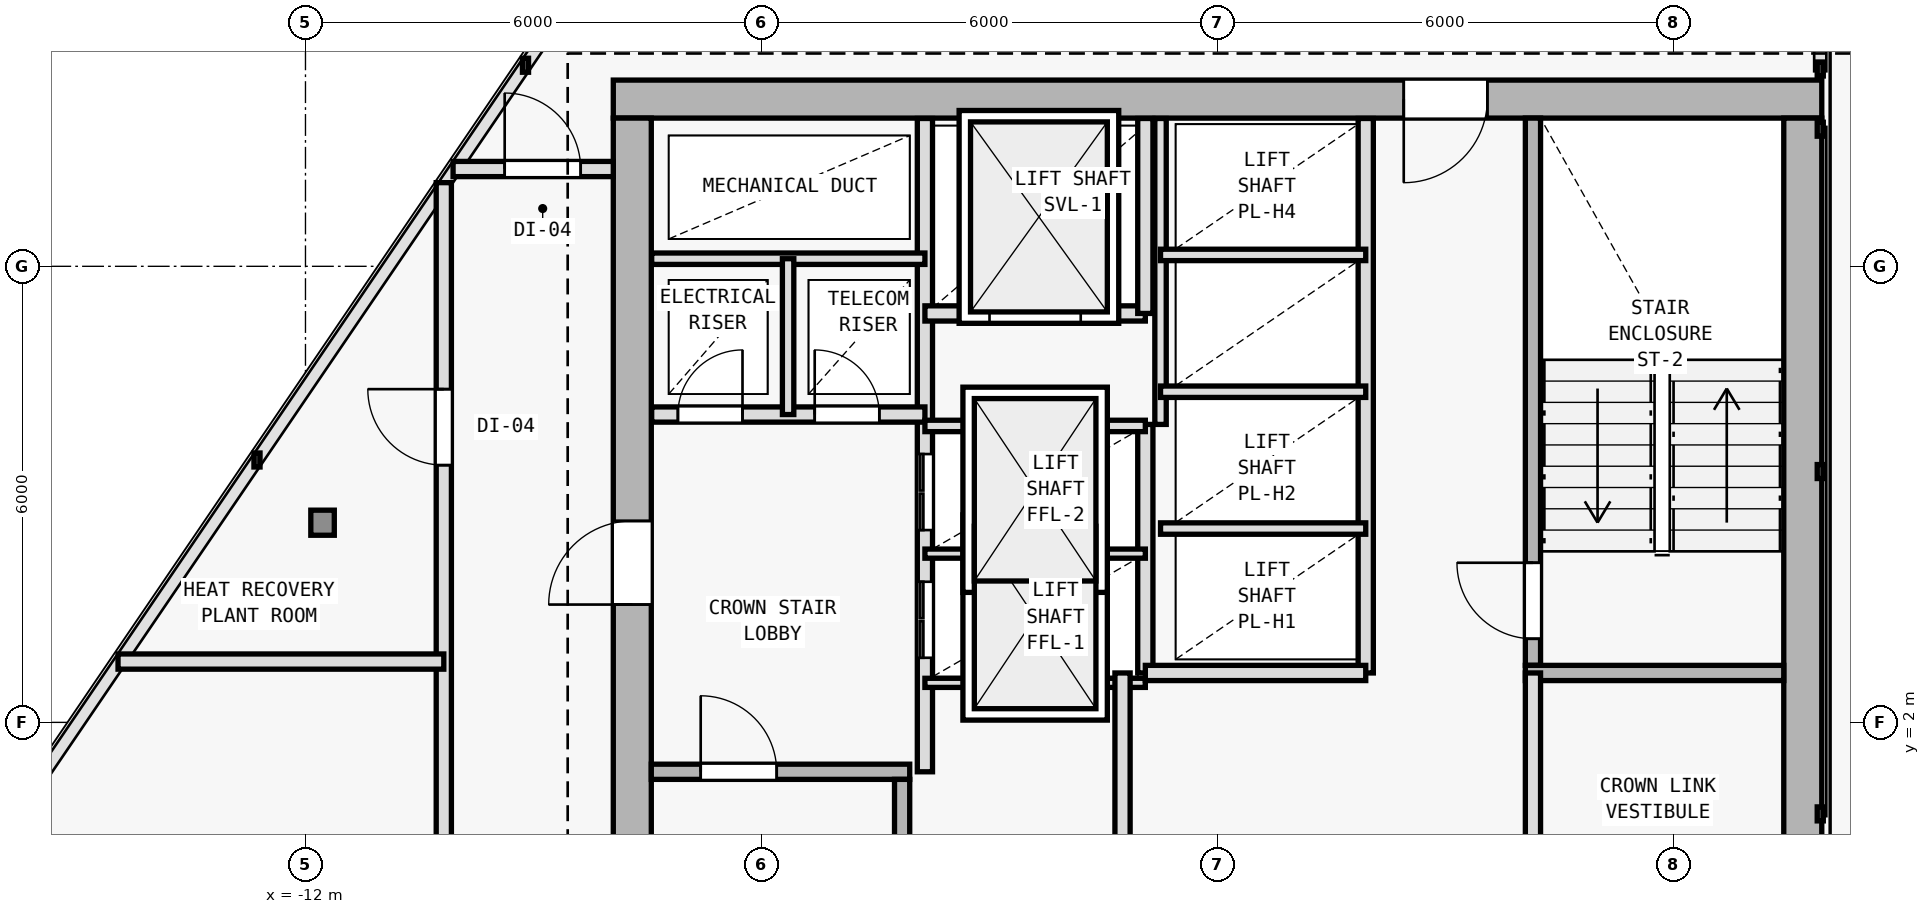
"""IFC4 building model, lengths in metres.
Left out: names, types, materials, properties, quantities, classifications, styles, units other than length and angle.
Written with IfcOpenShell. Run it as: python <this file> out.ifc"""

import sys

from ifc_helpers import new_model, si_unit, direction, frame, frame_2d, origin, origin_2d, place, context, subcontext, project, spatial, rectangle, i_section, extrude, element, fill, save


model = new_model("IFC4")
c1 = context("Model", 3, precision=1e-05, world=origin(), true_north=direction((0.0, 1.0)))
c2 = subcontext(c1, "Body", "Model", "MODEL_VIEW")
j1 = project(units=[si_unit("LENGTHUNIT", "METRE"), si_unit("PLANEANGLEUNIT", "RADIAN")], contexts=[c1])
p1 = place(None, origin())
s1 = spatial("IfcSite", under=j1, at=p1, CompositionType="ELEMENT")
p2 = place(p1, origin())
s2 = spatial("IfcBuilding", under=s1, at=p2, CompositionType="ELEMENT")
p3 = place(p2, frame((0.0, 0.0, 297.6)))
s3 = spatial("IfcBuildingStorey", under=s2, at=p3, CompositionType="ELEMENT", Elevation=297.6)
for number, where, z_axis, x_axis in (
    (1, (7.7, 10.2, 0.0), (0.0, 0.0, 1.0), (1.0, 0.0, 0.0)),
    (2, (-7.7, 10.2, 0.0), (0.0, 0.0, 1.0), (1.0, 0.0, 0.0)),
    (3, (7.7, 0.4, 0.0), (0.0, 0.0, 1.0), (1.0, 0.0, 0.0)),
    (4, (-7.7, 2.0, 0.0), (0.0, 0.0, 1.0), (1.0, 0.0, 0.0)),
):
    element("IfcColumn", number, at=place(p3, frame(where, z_axis=z_axis, x_axis=x_axis)), inside=s3, PredefinedType="COLUMN", context=c2, shape_type="SweptSolid", body=[
        extrude(i_section(OverallWidth=0.374, OverallDepth=0.372, WebThickness=0.012, FlangeThickness=0.02, FilletRadius=0.015, at=origin_2d()), origin(), (0.0, 0.0, 1.0), 3.6),
    ])
p4 = place(p3, frame((-11.775, 4.627, 0.0), z_axis=(0.0, 0.0, 1.0), x_axis=(1.0, 0.0, 0.0)))
e5 = element("IfcColumn", 5, at=p4, inside=s3, PredefinedType="COLUMN", context=c2, shape_type="SweptSolid", body=[
    extrude(i_section(OverallWidth=0.309, OverallDepth=0.33, WebThickness=0.011, FlangeThickness=0.019, FilletRadius=0.027, at=origin_2d()), origin(), (0.0, 0.0, 1.0), 3.6),
])
p5 = place(p3, frame((7.95, 10.2, 0.0), z_axis=(0.0, 0.0, 1.0), x_axis=(-1.0, 0.0, 0.0)))
e6 = element("IfcWall", 6, at=p5, inside=s3, PredefinedType="SHEAR", context=c2, shape_type="SweptSolid", body=[
    extrude(rectangle(XDim=15.9, YDim=0.5, at=frame_2d((7.95, 0.0))), origin(), (0.0, 0.0, 1.0), 3.34),
])
p6 = place(p5, frame((4.4, 0.0, 0.0)))
e7 = element("IfcOpeningElement", 7, at=p6, cuts=e6, PredefinedType="OPENING", context=c2, shape_type="SweptSolid", body=[
    extrude(rectangle(XDim=1.1, YDim=2.15, at=frame_2d((0.55, 1.075))), frame((0.0, 0.26, 0.0), z_axis=(0.0, -1.0, 0.0), x_axis=(1.0, 0.0, 0.0)), (0.0, 0.0, 1.0), 0.52),
])
p7 = place(p3, frame((-7.7, -9.15, 0.0), z_axis=(0.0, 0.0, 1.0), x_axis=(0.0, 1.0, 0.0)))
e8 = element("IfcWall", 8, at=p7, inside=s3, PredefinedType="SHEAR", context=c2, shape_type="SweptSolid", body=[
    extrude(rectangle(XDim=19.1, YDim=0.5, at=frame_2d((9.55, 0.0))), origin(), (0.0, 0.0, 1.0), 3.34),
])
p8 = place(p7, frame((12.7, 0.0, 0.0)))
e9 = element("IfcOpeningElement", 9, at=p8, cuts=e8, PredefinedType="OPENING", context=c2, shape_type="SweptSolid", body=[
    extrude(rectangle(XDim=1.1, YDim=2.15, at=frame_2d((0.55, 1.075))), frame((0.0, 0.26, 0.0), z_axis=(0.0, -1.0, 0.0), x_axis=(1.0, 0.0, 0.0)), (0.0, 0.0, 1.0), 0.52),
])
p9 = place(p3, frame((7.7, 9.95, 0.0), z_axis=(0.0, 0.0, 1.0), x_axis=(0.0, -1.0, 0.0)))
e10 = element("IfcWall", 10, at=p9, inside=s3, PredefinedType="SHEAR", context=c2, shape_type="SweptSolid", body=[
    extrude(rectangle(XDim=19.1, YDim=0.5, at=frame_2d((9.55, 0.0))), origin(), (0.0, 0.0, 1.0), 3.34),
])
p10 = place(p9, frame((13.5, 0.0, 0.0)))
e11 = element("IfcOpeningElement", 11, at=p10, cuts=e10, PredefinedType="OPENING", context=c2, shape_type="SweptSolid", body=[
    extrude(rectangle(XDim=1.1, YDim=2.15, at=frame_2d((0.55, 1.075))), frame((0.0, 0.26, 0.0), z_axis=(0.0, -1.0, 0.0), x_axis=(1.0, 0.0, 0.0)), (0.0, 0.0, 1.0), 0.52),
])
p11 = place(p3, frame((-7.45, 1.35, 0.0), z_axis=(0.0, 0.0, 1.0), x_axis=(1.0, 0.0, 0.0)))
e12 = element("IfcWall", 12, at=p11, inside=s3, PredefinedType="SOLIDWALL", context=c2, shape_type="SweptSolid", body=[
    extrude(rectangle(XDim=3.4, YDim=0.2, at=frame_2d((1.7, 0.0))), origin(), (0.0, 0.0, 1.0), 3.34),
])
p12 = place(p11, frame((0.65, 0.0, 0.0)))
e13 = element("IfcOpeningElement", 13, at=p12, cuts=e12, PredefinedType="OPENING", context=c2, shape_type="SweptSolid", body=[
    extrude(rectangle(XDim=1.0, YDim=2.15, at=frame_2d((0.5, 1.075))), frame((0.0, 0.11, 0.0), z_axis=(0.0, -1.0, 0.0), x_axis=(1.0, 0.0, 0.0)), (0.0, 0.0, 1.0), 0.22),
])
p13 = place(p3, frame((-4.15, -5.95, 0.0), z_axis=(0.0, 0.0, 1.0), x_axis=(0.0, 1.0, 0.0)))
e14 = element("IfcWall", 14, at=p13, inside=s3, PredefinedType="SOLIDWALL", context=c2, shape_type="SweptSolid", body=[
    extrude(rectangle(XDim=7.2, YDim=0.2, at=frame_2d((3.6, 0.0))), origin(), (0.0, 0.0, 1.0), 3.34),
])
p14 = place(p3, frame((-3.85, 1.35, 0.0), z_axis=(0.0, 0.0, 1.0), x_axis=(0.0, 1.0, 0.0)))
e15 = element("IfcWall", 15, at=p14, inside=s3, PredefinedType="SOLIDWALL", context=c2, shape_type="SweptSolid", body=[
    extrude(rectangle(XDim=8.595, YDim=0.2, at=frame_2d((4.297, 0.0))), origin(), (0.0, 0.0, 1.0), 3.34),
])
p15 = place(p14, frame((1.5, 0.0, 0.0)))
e16 = element("IfcOpeningElement", 16, at=p15, cuts=e15, PredefinedType="OPENING", context=c2, shape_type="SweptSolid", body=[
    extrude(rectangle(XDim=1.0, YDim=2.15, at=frame_2d((0.5, 1.075))), frame((0.0, 0.11, 0.0), z_axis=(0.0, -1.0, 0.0), x_axis=(1.0, 0.0, 0.0)), (0.0, 0.0, 1.0), 0.22),
])
p16 = place(p14, frame((3.18, 0.0, 0.0)))
e17 = element("IfcOpeningElement", 17, at=p16, cuts=e15, PredefinedType="OPENING", context=c2, shape_type="SweptSolid", body=[
    extrude(rectangle(XDim=1.0, YDim=2.15, at=frame_2d((0.5, 1.075))), frame((0.0, 0.11, 0.0), z_axis=(0.0, -1.0, 0.0), x_axis=(1.0, 0.0, 0.0)), (0.0, 0.0, 1.0), 0.22),
])
p17 = place(p3, frame((-7.445, 6.05, 0.0), z_axis=(0.0, 0.0, 1.0), x_axis=(1.0, 0.0, 0.0)))
e18 = element("IfcWall", 18, at=p17, inside=s3, PredefinedType="SOLIDWALL", context=c2, shape_type="SweptSolid", body=[
    extrude(rectangle(XDim=3.595, YDim=0.2, at=frame_2d((1.797, 0.0))), origin(), (0.0, 0.0, 1.0), 3.34),
])
p18 = place(p17, frame((0.345, 0.0, 0.0)))
e19 = element("IfcOpeningElement", 19, at=p18, cuts=e18, PredefinedType="OPENING", context=c2, shape_type="SweptSolid", body=[
    extrude(rectangle(XDim=0.85, YDim=2.1, at=frame_2d((0.425, 1.05))), frame((0.0, 0.11, 0.0), z_axis=(0.0, -1.0, 0.0), x_axis=(1.0, 0.0, 0.0)), (0.0, 0.0, 1.0), 0.22),
])
p19 = place(p17, frame((2.145, 0.0, 0.0)))
e20 = element("IfcOpeningElement", 20, at=p19, cuts=e18, PredefinedType="OPENING", context=c2, shape_type="SweptSolid", body=[
    extrude(rectangle(XDim=0.85, YDim=2.1, at=frame_2d((0.425, 1.05))), frame((0.0, 0.11, 0.0), z_axis=(0.0, -1.0, 0.0), x_axis=(1.0, 0.0, 0.0)), (0.0, 0.0, 1.0), 0.22),
])
p20 = place(p3, frame((-7.445, 8.1, 0.0), z_axis=(0.0, 0.0, 1.0), x_axis=(1.0, 0.0, 0.0)))
e21 = element("IfcWall", 21, at=p20, inside=s3, PredefinedType="PARTITIONING", context=c2, shape_type="SweptSolid", body=[
    extrude(rectangle(XDim=3.595, YDim=0.15, at=frame_2d((1.797, 0.0))), origin(), (0.0, 0.0, 1.0), 3.34),
])
p21 = place(p3, frame((-5.65, 6.05, 0.0), z_axis=(0.0, 0.0, 1.0), x_axis=(0.0, 1.0, 0.0)))
e22 = element("IfcWall", 22, at=p21, inside=s3, PredefinedType="PARTITIONING", context=c2, shape_type="SweptSolid", body=[
    extrude(rectangle(XDim=2.05, YDim=0.15, at=frame_2d((1.025, 0.0))), origin(), (0.0, 0.0, 1.0), 3.34),
])
p22 = place(p3, frame((4.15, 2.75, 0.0), z_axis=(0.0, 0.0, 1.0), x_axis=(0.0, 1.0, 0.0)))
e23 = element("IfcWall", 23, at=p22, inside=s3, PredefinedType="SOLIDWALL", context=c2, shape_type="SweptSolid", body=[
    extrude(rectangle(XDim=7.2, YDim=0.2, at=frame_2d((3.6, 0.0))), origin(), (0.0, 0.0, 1.0), 3.34),
])
p23 = place(p22, frame((0.35, 0.0, 0.0)))
e24 = element("IfcOpeningElement", 24, at=p23, cuts=e23, PredefinedType="OPENING", context=c2, shape_type="SweptSolid", body=[
    extrude(rectangle(XDim=1.0, YDim=2.15, at=frame_2d((0.5, 1.075))), frame((0.0, 0.11, 0.0), z_axis=(0.0, -1.0, 0.0), x_axis=(1.0, 0.0, 0.0)), (0.0, 0.0, 1.0), 0.22),
])
p24 = place(p3, frame((4.05, 2.65, 0.0), z_axis=(0.0, 0.0, 1.0), x_axis=(1.0, 0.0, 0.0)))
e25 = element("IfcWall", 25, at=p24, inside=s3, PredefinedType="SOLIDWALL", context=c2, shape_type="SweptSolid", body=[
    extrude(rectangle(XDim=3.4, YDim=0.2, at=frame_2d((1.7, 0.0))), origin(), (0.0, 0.0, 1.0), 3.34),
])
p25 = place(p3, frame((-0.95, 2.65, 0.0), z_axis=(0.0, 0.0, 1.0), x_axis=(0.0, 1.0, 0.0)))
e26 = element("IfcWall", 26, at=p25, inside=s3, PredefinedType="SOLIDWALL", context=c2, shape_type="SweptSolid", body=[
    extrude(rectangle(XDim=3.27, YDim=0.2, at=frame_2d((1.635, 0.0))), origin(), (0.0, 0.0, 1.0), 3.34),
])
for number, where, z_axis, x_axis in (
    (27, (-3.85, 2.52, 0.0), (0.0, 0.0, 1.0), (1.0, 0.0, 0.0)),
    (28, (-3.85, 4.22, 0.0), (0.0, 0.0, 1.0), (1.0, 0.0, 0.0)),
):
    element("IfcWall", number, at=place(p3, frame(where, z_axis=z_axis, x_axis=x_axis)), inside=s3, PredefinedType="PARTITIONING", context=c2, shape_type="SweptSolid", body=[
        extrude(rectangle(XDim=2.9, YDim=0.12, at=frame_2d((1.45, 0.0))), origin(), (0.0, 0.0, 1.0), 3.34),
    ])
p26 = place(p3, frame((-3.85, 5.9, 0.0), z_axis=(0.0, 0.0, 1.0), x_axis=(1.0, 0.0, 0.0)))
e29 = element("IfcWall", 29, at=p26, inside=s3, PredefinedType="PARTITIONING", context=c2, shape_type="SweptSolid", body=[
    extrude(rectangle(XDim=2.9, YDim=0.15, at=frame_2d((1.45, 0.0))), origin(), (0.0, 0.0, 1.0), 3.34),
])
p27 = place(p3, frame((-3.85, 7.38, 0.0), z_axis=(0.0, 0.0, 1.0), x_axis=(1.0, 0.0, 0.0)))
e30 = element("IfcWall", 30, at=p27, inside=s3, PredefinedType="SOLIDWALL", context=c2, shape_type="SweptSolid", body=[
    extrude(rectangle(XDim=2.9, YDim=0.2, at=frame_2d((1.45, 0.0))), origin(), (0.0, 0.0, 1.0), 3.34),
])
p28 = place(p27, frame((0.85, 0.0, 0.0)))
e31 = element("IfcOpeningElement", 31, at=p28, cuts=e30, PredefinedType="OPENING", context=c2, shape_type="SweptSolid", body=[
    extrude(rectangle(XDim=1.2, YDim=2.2, at=frame_2d((0.6, 1.1))), frame((0.0, 0.11, 0.0), z_axis=(0.0, -1.0, 0.0), x_axis=(1.0, 0.0, 0.0)), (0.0, 0.0, 1.0), 0.22),
])
p29 = place(p3, frame((-0.95, 7.38, 0.0), z_axis=(0.0, 0.0, 1.0), x_axis=(0.0, 1.0, 0.0)))
e32 = element("IfcWall", 32, at=p29, inside=s3, PredefinedType="SOLIDWALL", context=c2, shape_type="SweptSolid", body=[
    extrude(rectangle(XDim=2.565, YDim=0.2, at=frame_2d((1.283, 0.0))), origin(), (0.0, 0.0, 1.0), 3.34),
])
p30 = place(p3, frame((4.15, -6.05, 0.0), z_axis=(0.0, 0.0, 1.0), x_axis=(0.0, 1.0, 0.0)))
e33 = element("IfcWall", 33, at=p30, inside=s3, PredefinedType="SOLIDWALL", context=c2, shape_type="SweptSolid", body=[
    extrude(rectangle(XDim=8.7, YDim=0.2, at=frame_2d((4.35, 0.0))), origin(), (0.0, 0.0, 1.0), 3.34),
])
p31 = place(p30, frame((3.6, 0.0, 0.0)))
e34 = element("IfcOpeningElement", 34, at=p31, cuts=e33, PredefinedType="OPENING", context=c2, shape_type="SweptSolid", body=[
    extrude(rectangle(XDim=1.0, YDim=2.15, at=frame_2d((0.5, 1.075))), frame((0.0, 0.11, 0.0), z_axis=(0.0, -1.0, 0.0), x_axis=(1.0, 0.0, 0.0)), (0.0, 0.0, 1.0), 0.22),
])
p32 = place(p3, frame((-1.25, -6.05, 0.0), z_axis=(0.0, 0.0, 1.0), x_axis=(0.0, 1.0, 0.0)))
e35 = element("IfcWall", 35, at=p32, inside=s3, PredefinedType="SOLIDWALL", context=c2, shape_type="SweptSolid", body=[
    extrude(rectangle(XDim=8.7, YDim=0.2, at=frame_2d((4.35, 0.0))), origin(), (0.0, 0.0, 1.0), 3.34),
])
p33 = place(p32, frame((3.4, 0.0, 0.0)))
e36 = element("IfcOpeningElement", 36, at=p33, cuts=e35, PredefinedType="OPENING", context=c2, shape_type="SweptSolid", body=[
    extrude(rectangle(XDim=0.95, YDim=2.1, at=frame_2d((0.475, 1.05))), frame((0.0, 0.11, 0.0), z_axis=(0.0, -1.0, 0.0), x_axis=(1.0, 0.0, 0.0)), (0.0, 0.0, 1.0), 0.22),
])
p34 = place(p3, frame((1.95, 2.65, 0.0), z_axis=(0.0, 0.0, 1.0), x_axis=(0.0, 1.0, 0.0)))
e37 = element("IfcWall", 37, at=p34, inside=s3, PredefinedType="SOLIDWALL", context=c2, shape_type="SweptSolid", body=[
    extrude(rectangle(XDim=7.295, YDim=0.2, at=frame_2d((3.647, 0.0))), origin(), (0.0, 0.0, 1.0), 3.34),
])
p35 = place(p3, frame((-0.95, 2.65, 0.0), z_axis=(0.0, 0.0, 1.0), x_axis=(1.0, 0.0, 0.0)))
e38 = element("IfcWall", 38, at=p35, inside=s3, PredefinedType="SOLIDWALL", context=c2, shape_type="SweptSolid", body=[
    extrude(rectangle(XDim=2.9, YDim=0.2, at=frame_2d((1.45, 0.0))), origin(), (0.0, 0.0, 1.0), 3.34),
])
p36 = place(p3, frame((-0.75, 5.92, 0.0), z_axis=(0.0, 0.0, 1.0), x_axis=(0.0, 1.0, 0.0)))
e39 = element("IfcWall", 39, at=p36, inside=s3, PredefinedType="PARTITIONING", context=c2, shape_type="SweptSolid", body=[
    extrude(rectangle(XDim=4.025, YDim=0.15, at=frame_2d((2.013, 0.0))), origin(), (0.0, 0.0, 1.0), 3.34),
])
for number, where, z_axis, x_axis in (
    (40, (-0.75, 4.55, 0.0), (0.0, 0.0, 1.0), (1.0, 0.0, 0.0)),
    (41, (-0.75, 6.35, 0.0), (0.0, 0.0, 1.0), (1.0, 0.0, 0.0)),
    (42, (-0.75, 8.15, 0.0), (0.0, 0.0, 1.0), (1.0, 0.0, 0.0)),
):
    element("IfcWall", number, at=place(p3, frame(where, z_axis=z_axis, x_axis=x_axis)), inside=s3, PredefinedType="PARTITIONING", context=c2, shape_type="SweptSolid", body=[
        extrude(rectangle(XDim=2.7, YDim=0.15, at=frame_2d((1.35, 0.0))), origin(), (0.0, 0.0, 1.0), 3.34),
    ])
p37 = place(p3, frame((-10.18, -11.68, 0.0), z_axis=(0.0, 0.0, 1.0), x_axis=(0.0, 1.0, 0.0)))
e43 = element("IfcWall", 43, at=p37, inside=s3, PredefinedType="SOLIDWALL", context=c2, shape_type="SweptSolid", body=[
    extrude(rectangle(XDim=20.781, YDim=0.2, at=frame_2d((10.39, 0.0))), origin(), (0.0, 0.0, 1.0), 2.995),
])
p38 = place(p37, frame((10.48, 0.0, 0.0)))
e44 = element("IfcOpeningElement", 44, at=p38, cuts=e43, PredefinedType="OPENING", context=c2, shape_type="SweptSolid", body=[
    extrude(rectangle(XDim=1.0, YDim=2.15, at=frame_2d((0.5, 1.075))), frame((0.0, 0.11, 0.0), z_axis=(0.0, -1.0, 0.0), x_axis=(1.0, 0.0, 0.0)), (0.0, 0.0, 1.0), 0.22),
])
p39 = place(p37, frame((17.064, 0.0, 0.0)))
e45 = element("IfcOpeningElement", 45, at=p39, cuts=e43, PredefinedType="OPENING", context=c2, shape_type="SweptSolid", body=[
    extrude(rectangle(XDim=1.0, YDim=2.15, at=frame_2d((0.5, 1.075))), frame((0.0, 0.11, 0.0), z_axis=(0.0, -1.0, 0.0), x_axis=(1.0, 0.0, 0.0)), (0.0, 0.0, 1.0), 0.22),
])
p40 = place(p3, frame((-10.058, 9.28, 0.0), z_axis=(0.0, 0.0, 1.0), x_axis=(1.0, 0.0, 0.0)))
e46 = element("IfcWall", 46, at=p40, inside=s3, PredefinedType="SOLIDWALL", context=c2, shape_type="SweptSolid", body=[
    extrude(rectangle(XDim=2.108, YDim=0.2, at=frame_2d((1.054, 0.0))), origin(), (0.0, 0.0, 1.0), 3.34),
])
p41 = place(p40, frame((0.679, 0.0, 0.0)))
e47 = element("IfcOpeningElement", 47, at=p41, cuts=e46, PredefinedType="OPENING", context=c2, shape_type="SweptSolid", body=[
    extrude(rectangle(XDim=1.0, YDim=2.15, at=frame_2d((0.5, 1.075))), frame((0.0, 0.11, 0.0), z_axis=(0.0, -1.0, 0.0), x_axis=(1.0, 0.0, 0.0)), (0.0, 0.0, 1.0), 0.22),
])
p42 = place(p3, frame((-14.466, 2.8, 0.0), z_axis=(0.0, 0.0, 1.0), x_axis=(1.0, 0.0, 0.0)))
e48 = element("IfcWall", 48, at=p42, inside=s3, PredefinedType="SOLIDWALL", context=c2, shape_type="SweptSolid", body=[
    extrude(rectangle(XDim=4.286, YDim=0.2, at=frame_2d((2.143, 0.0))), origin(), (0.0, 0.0, 1.0), 3.34),
])
p43 = place(p8, origin())
e49 = element("IfcDoor", 49, at=p43, inside=s3, OperationType="SINGLE_SWING_LEFT", PredefinedType="DOOR", context=c2, shape_type="SweptSolid", body=[
    extrude(rectangle(XDim=1.1, YDim=2.15, at=frame_2d((0.55, 1.075))), frame((0.0, 0.025, 0.0), z_axis=(0.0, -1.0, 0.0), x_axis=(1.0, 0.0, 0.0)), (0.0, 0.0, 1.0), 0.05),
])
fill(e9, e49)
p44 = place(p6, origin())
e50 = element("IfcDoor", 50, at=p44, inside=s3, OperationType="SINGLE_SWING_RIGHT", PredefinedType="DOOR", context=c2, shape_type="SweptSolid", body=[
    extrude(rectangle(XDim=1.1, YDim=2.15, at=frame_2d((0.55, 1.075))), frame((0.0, 0.025, 0.0), z_axis=(0.0, -1.0, 0.0), x_axis=(1.0, 0.0, 0.0)), (0.0, 0.0, 1.0), 0.05),
])
fill(e7, e50)
p45 = place(p12, origin())
e51 = element("IfcDoor", 51, at=p45, inside=s3, OperationType="SINGLE_SWING_LEFT", PredefinedType="DOOR", context=c2, shape_type="SweptSolid", body=[
    extrude(rectangle(XDim=1.0, YDim=2.15, at=frame_2d((0.5, 1.075))), frame((0.0, 0.025, 0.0), z_axis=(0.0, -1.0, 0.0), x_axis=(1.0, 0.0, 0.0)), (0.0, 0.0, 1.0), 0.05),
])
fill(e13, e51)
p46 = place(p18, origin())
e52 = element("IfcDoor", 52, at=p46, inside=s3, OperationType="SINGLE_SWING_RIGHT", PredefinedType="DOOR", context=c2, shape_type="SweptSolid", body=[
    extrude(rectangle(XDim=0.85, YDim=2.1, at=frame_2d((0.425, 1.05))), frame((0.0, 0.025, 0.0), z_axis=(0.0, -1.0, 0.0), x_axis=(1.0, 0.0, 0.0)), (0.0, 0.0, 1.0), 0.05),
])
fill(e19, e52)
p47 = place(p19, origin())
e53 = element("IfcDoor", 53, at=p47, inside=s3, OperationType="SINGLE_SWING_LEFT", PredefinedType="DOOR", context=c2, shape_type="SweptSolid", body=[
    extrude(rectangle(XDim=0.85, YDim=2.1, at=frame_2d((0.425, 1.05))), frame((0.0, 0.025, 0.0), z_axis=(0.0, -1.0, 0.0), x_axis=(1.0, 0.0, 0.0)), (0.0, 0.0, 1.0), 0.05),
])
fill(e20, e53)
p48 = place(p23, origin())
e54 = element("IfcDoor", 54, at=p48, inside=s3, OperationType="SINGLE_SWING_RIGHT", PredefinedType="DOOR", context=c2, shape_type="SweptSolid", body=[
    extrude(rectangle(XDim=1.0, YDim=2.15, at=frame_2d((0.5, 1.075))), frame((0.0, 0.025, 0.0), z_axis=(0.0, -1.0, 0.0), x_axis=(1.0, 0.0, 0.0)), (0.0, 0.0, 1.0), 0.05),
])
fill(e24, e54)
p49 = place(p28, origin())
e55 = element("IfcDoor", 55, at=p49, inside=s3, OperationType="DOUBLE_DOOR_SLIDING", PredefinedType="DOOR", context=c2, shape_type="SweptSolid", body=[
    extrude(rectangle(XDim=1.2, YDim=2.2, at=frame_2d((0.6, 1.1))), frame((0.0, 0.025, 0.0), z_axis=(0.0, -1.0, 0.0), x_axis=(1.0, 0.0, 0.0)), (0.0, 0.0, 1.0), 0.05),
])
fill(e31, e55)
p50 = place(p15, origin())
e56 = element("IfcDoor", 56, at=p50, inside=s3, OperationType="DOUBLE_DOOR_SLIDING", PredefinedType="DOOR", context=c2, shape_type="SweptSolid", body=[
    extrude(rectangle(XDim=1.0, YDim=2.15, at=frame_2d((0.5, 1.075))), frame((0.0, 0.025, 0.0), z_axis=(0.0, -1.0, 0.0), x_axis=(1.0, 0.0, 0.0)), (0.0, 0.0, 1.0), 0.05),
])
fill(e16, e56)
p51 = place(p16, origin())
e57 = element("IfcDoor", 57, at=p51, inside=s3, OperationType="DOUBLE_DOOR_SLIDING", PredefinedType="DOOR", context=c2, shape_type="SweptSolid", body=[
    extrude(rectangle(XDim=1.0, YDim=2.15, at=frame_2d((0.5, 1.075))), frame((0.0, 0.025, 0.0), z_axis=(0.0, -1.0, 0.0), x_axis=(1.0, 0.0, 0.0)), (0.0, 0.0, 1.0), 0.05),
])
fill(e17, e57)
p52 = place(p41, origin())
e58 = element("IfcDoor", 58, at=p52, inside=s3, OperationType="SINGLE_SWING_LEFT", PredefinedType="DOOR", context=c2, shape_type="SweptSolid", body=[
    extrude(rectangle(XDim=1.0, YDim=2.15, at=frame_2d((0.5, 1.075))), frame((0.0, 0.025, 0.0), z_axis=(0.0, -1.0, 0.0), x_axis=(1.0, 0.0, 0.0)), (0.0, 0.0, 1.0), 0.05),
])
fill(e47, e58)
p53 = place(p39, origin())
e59 = element("IfcDoor", 59, at=p53, inside=s3, OperationType="SINGLE_SWING_RIGHT", PredefinedType="DOOR", context=c2, shape_type="SweptSolid", body=[
    extrude(rectangle(XDim=1.0, YDim=2.15, at=frame_2d((0.5, 1.075))), frame((0.0, 0.025, 0.0), z_axis=(0.0, -1.0, 0.0), x_axis=(1.0, 0.0, 0.0)), (0.0, 0.0, 1.0), 0.05),
])
fill(e45, e59)
save(model, sys.argv[1])
